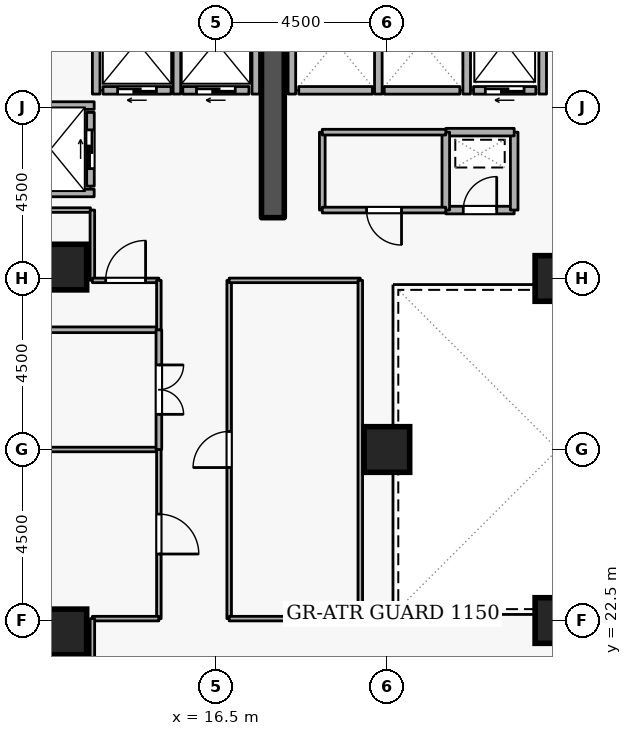
"""IFC4 building model, lengths in metres.
Left out: names, types, materials, properties, quantities, classifications, styles, units other than length and angle.
Written with IfcOpenShell. Run it as: python <this file> out.ifc"""

import sys

from ifc_helpers import new_model, si_unit, direction, frame, frame_2d, origin, origin_2d, place, context, subcontext, project, spatial, rectangle, extrude, element, fill, save


model = new_model("IFC4")
c1 = context("Model", 3, precision=1e-05, world=origin(), true_north=direction((0.0, 1.0)))
c2 = subcontext(c1, "Body", "Model", "MODEL_VIEW")
j1 = project(units=[si_unit("LENGTHUNIT", "METRE"), si_unit("PLANEANGLEUNIT", "RADIAN")], contexts=[c1])
p1 = place(None, origin())
s1 = spatial("IfcSite", under=j1, at=p1, CompositionType="ELEMENT")
p2 = place(p1, origin())
s2 = spatial("IfcBuilding", under=s1, at=p2, CompositionType="ELEMENT")
p3 = place(p2, frame((0.0, 0.0, 108.9)))
s3 = spatial("IfcBuildingStorey", under=s2, at=p3, CompositionType="ELEMENT", Elevation=108.9)
p4 = place(p3, frame((18.0, 33.1, 0.0), z_axis=(0.0, 0.0, 1.0), x_axis=(0.0, 1.0, 0.0)))
e1 = element("IfcWall", 1, at=p4, inside=s3, PredefinedType="SHEAR", context=c2, shape_type="SweptSolid", body=[
    extrude(rectangle(XDim=5.7, YDim=0.6, at=frame_2d((2.85, 0.0))), origin(), (0.0, 0.0, 1.0), 3.6),
])
for number, where, z_axis, x_axis in (
    (2, (12.5, 22.2, 0.0), (0.0, 0.0, 1.0), (1.0, 0.0, 0.0)),
    (3, (12.5, 31.8, 0.0), (0.0, 0.0, 1.0), (1.0, 0.0, 0.0)),
    (4, (25.5, 22.5, 0.0), (0.0, 0.0, 1.0), (1.0, 0.0, 0.0)),
    (5, (25.5, 31.5, 0.0), (0.0, 0.0, 1.0), (1.0, 0.0, 0.0)),
    (6, (21.0, 27.0, 0.0), (0.0, 0.0, 1.0), (1.0, 0.0, 0.0)),
):
    element("IfcColumn", number, at=place(p3, frame(where, z_axis=z_axis, x_axis=x_axis)), inside=s3, PredefinedType="COLUMN", context=c2, shape_type="SweptSolid", body=[
        extrude(rectangle(XDim=1.2, YDim=1.2, at=origin_2d()), origin(), (0.0, 0.0, 1.0), 3.6),
    ])
p5 = place(p3, frame((24.92, 36.45, 0.0), z_axis=(0.0, 0.0, 1.0), x_axis=(-1.0, 0.0, 0.0)))
e7 = element("IfcWall", 7, at=p5, inside=s3, PredefinedType="STANDARD", context=c2, shape_type="SweptSolid", body=[
    extrude(rectangle(XDim=1.64, YDim=0.2, at=frame_2d((0.82, 0.0))), origin(), (0.0, 0.0, 1.0), 3.34),
])
p6 = place(p5, frame((0.31, 0.0, 0.0)))
e8 = element("IfcOpeningElement", 8, at=p6, cuts=e7, PredefinedType="OPENING", context=c2, shape_type="SweptSolid", body=[
    extrude(rectangle(XDim=1.02, YDim=2.06, at=frame_2d((0.51, 1.03))), frame((0.0, 0.11, 0.0), z_axis=(0.0, -1.0, 0.0), x_axis=(1.0, 0.0, 0.0)), (0.0, 0.0, 1.0), 0.22),
])
p7 = place(p3, frame((22.92, 36.45, 0.0), z_axis=(0.0, 0.0, 1.0), x_axis=(-1.0, 0.0, 0.0)))
e9 = element("IfcWall", 9, at=p7, inside=s3, PredefinedType="STANDARD", context=c2, shape_type="SweptSolid", body=[
    extrude(rectangle(XDim=1.99, YDim=0.2, at=frame_2d((0.995, 0.0))), origin(), (0.0, 0.0, 1.0), 3.34),
])
p8 = place(p3, frame((20.62, 36.45, 0.0), z_axis=(0.0, 0.0, 1.0), x_axis=(-1.0, 0.0, 0.0)))
e10 = element("IfcWall", 10, at=p8, inside=s3, PredefinedType="STANDARD", context=c2, shape_type="SweptSolid", body=[
    extrude(rectangle(XDim=1.94, YDim=0.2, at=frame_2d((0.97, 0.0))), origin(), (0.0, 0.0, 1.0), 3.34),
])
p9 = place(p3, frame((17.37, 36.45, 0.0), z_axis=(0.0, 0.0, 1.0), x_axis=(-1.0, 0.0, 0.0)))
e11 = element("IfcWall", 11, at=p9, inside=s3, PredefinedType="STANDARD", context=c2, shape_type="SweptSolid", body=[
    extrude(rectangle(XDim=1.74, YDim=0.2, at=frame_2d((0.87, 0.0))), origin(), (0.0, 0.0, 1.0), 3.34),
])
p10 = place(p9, frame((0.36, 0.0, 0.0)))
e12 = element("IfcOpeningElement", 12, at=p10, cuts=e11, PredefinedType="OPENING", context=c2, shape_type="SweptSolid", body=[
    extrude(rectangle(XDim=1.02, YDim=2.06, at=frame_2d((0.51, 1.03))), frame((0.0, 0.11, 0.0), z_axis=(0.0, -1.0, 0.0), x_axis=(1.0, 0.0, 0.0)), (0.0, 0.0, 1.0), 0.22),
])
p11 = place(p3, frame((15.32, 36.45, 0.0), z_axis=(0.0, 0.0, 1.0), x_axis=(-1.0, 0.0, 0.0)))
e13 = element("IfcWall", 13, at=p11, inside=s3, PredefinedType="STANDARD", context=c2, shape_type="SweptSolid", body=[
    extrude(rectangle(XDim=1.79, YDim=0.2, at=frame_2d((0.895, 0.0))), origin(), (0.0, 0.0, 1.0), 3.34),
])
p12 = place(p11, frame((0.385, 0.0, 0.0)))
e14 = element("IfcOpeningElement", 14, at=p12, cuts=e13, PredefinedType="OPENING", context=c2, shape_type="SweptSolid", body=[
    extrude(rectangle(XDim=1.02, YDim=2.06, at=frame_2d((0.51, 1.03))), frame((0.0, 0.11, 0.0), z_axis=(0.0, -1.0, 0.0), x_axis=(1.0, 0.0, 0.0)), (0.0, 0.0, 1.0), 0.22),
])
p13 = place(p3, frame((13.2, 33.93, 0.0), z_axis=(0.0, 0.0, 1.0), x_axis=(0.0, 1.0, 0.0)))
e15 = element("IfcWall", 15, at=p13, inside=s3, PredefinedType="STANDARD", context=c2, shape_type="SweptSolid", body=[
    extrude(rectangle(XDim=1.94, YDim=0.2, at=frame_2d((0.97, 0.0))), origin(), (0.0, 0.0, 1.0), 3.34),
])
p14 = place(p13, frame((0.46, 0.0, 0.0)))
e16 = element("IfcOpeningElement", 16, at=p14, cuts=e15, PredefinedType="OPENING", context=c2, shape_type="SweptSolid", body=[
    extrude(rectangle(XDim=1.02, YDim=2.06, at=frame_2d((0.51, 1.03))), frame((0.0, 0.11, 0.0), z_axis=(0.0, -1.0, 0.0), x_axis=(1.0, 0.0, 0.0)), (0.0, 0.0, 1.0), 0.22),
])
for number, where, z_axis, x_axis in (
    (17, (25.1, 36.352, 0.0), (0.0, 0.0, 1.0), (0.0, 1.0, 0.0)),
    (18, (23.1, 36.352, 0.0), (0.0, 0.0, 1.0), (0.0, 1.0, 0.0)),
    (19, (20.775, 36.352, 0.0), (0.0, 0.0, 1.0), (0.0, 1.0, 0.0)),
    (20, (18.5, 36.352, 0.0), (0.0, 0.0, 1.0), (0.0, 1.0, 0.0)),
):
    element("IfcWall", number, at=place(p3, frame(where, z_axis=z_axis, x_axis=x_axis)), inside=s3, PredefinedType="STANDARD", context=c2, shape_type="SweptSolid", body=[
        extrude(rectangle(XDim=2.436, YDim=0.2, at=frame_2d((1.218, 0.0))), origin(), (0.0, 0.0, 1.0), 3.34),
    ])
p15 = place(p3, frame((17.55, 36.352, 0.0), z_axis=(0.0, 0.0, 1.0), x_axis=(0.0, 1.0, 0.0)))
e21 = element("IfcWall", 21, at=p15, inside=s3, PredefinedType="STANDARD", context=c2, shape_type="SweptSolid", body=[
    extrude(rectangle(XDim=2.636, YDim=0.2, at=frame_2d((1.318, 0.0))), origin(), (0.0, 0.0, 1.0), 2.545),
])
for number, where, z_axis, x_axis in (
    (22, (15.475, 36.352, 0.0), (0.0, 0.0, 1.0), (0.0, 1.0, 0.0)),
    (23, (13.35, 36.352, 0.0), (0.0, 0.0, 1.0), (0.0, 1.0, 0.0)),
):
    element("IfcWall", number, at=place(p3, frame(where, z_axis=z_axis, x_axis=x_axis)), inside=s3, PredefinedType="STANDARD", context=c2, shape_type="SweptSolid", body=[
        extrude(rectangle(XDim=2.636, YDim=0.2, at=frame_2d((1.318, 0.0))), origin(), (0.0, 0.0, 1.0), 3.34),
    ])
for number, where, z_axis, x_axis in (
    (24, (11.002, 36.05, 0.0), (0.0, 0.0, 1.0), (1.0, 0.0, 0.0)),
    (25, (11.002, 33.75, 0.0), (0.0, 0.0, 1.0), (1.0, 0.0, 0.0)),
):
    element("IfcWall", number, at=place(p3, frame(where, z_axis=z_axis, x_axis=x_axis)), inside=s3, PredefinedType="STANDARD", context=c2, shape_type="SweptSolid", body=[
        extrude(rectangle(XDim=2.296, YDim=0.2, at=frame_2d((1.148, 0.0))), origin(), (0.0, 0.0, 1.0), 3.34),
    ])
p16 = place(p3, frame((22.55, 33.3, 0.0), z_axis=(0.0, 0.0, 1.0), x_axis=(1.0, 0.0, 0.0)))
e26 = element("IfcWall", 26, at=p16, inside=s3, PredefinedType="STANDARD", context=c2, shape_type="SweptSolid", body=[
    extrude(rectangle(XDim=1.8, YDim=0.2, at=frame_2d((0.9, 0.0))), origin(), (0.0, 0.0, 1.0), 3.34),
])
p17 = place(p16, frame((0.46, 0.0, 0.0)))
e27 = element("IfcOpeningElement", 27, at=p17, cuts=e26, PredefinedType="OPENING", context=c2, shape_type="SweptSolid", body=[
    extrude(rectangle(XDim=0.88, YDim=2.04, at=frame_2d((0.44, 1.02))), frame((0.0, 0.11, 0.0), z_axis=(0.0, -1.0, 0.0), x_axis=(1.0, 0.0, 0.0)), (0.0, 0.0, 1.0), 0.22),
])
p18 = place(p3, frame((24.35, 33.3, 0.0), z_axis=(0.0, 0.0, 1.0), x_axis=(0.0, 1.0, 0.0)))
e28 = element("IfcWall", 28, at=p18, inside=s3, PredefinedType="STANDARD", context=c2, shape_type="SweptSolid", body=[
    extrude(rectangle(XDim=2.05, YDim=0.2, at=frame_2d((1.025, 0.0))), origin(), (0.0, 0.0, 1.0), 3.34),
])
p19 = place(p3, frame((24.35, 35.35, 0.0), z_axis=(0.0, 0.0, 1.0), x_axis=(-1.0, 0.0, 0.0)))
e29 = element("IfcWall", 29, at=p19, inside=s3, PredefinedType="STANDARD", context=c2, shape_type="SweptSolid", body=[
    extrude(rectangle(XDim=1.8, YDim=0.2, at=frame_2d((0.9, 0.0))), origin(), (0.0, 0.0, 1.0), 3.34),
])
p20 = place(p3, frame((22.55, 35.35, 0.0), z_axis=(0.0, 0.0, 1.0), x_axis=(0.0, -1.0, 0.0)))
e30 = element("IfcWall", 30, at=p20, inside=s3, PredefinedType="STANDARD", context=c2, shape_type="SweptSolid", body=[
    extrude(rectangle(XDim=2.05, YDim=0.2, at=frame_2d((1.025, 0.0))), origin(), (0.0, 0.0, 1.0), 3.34),
])
p21 = place(p3, frame((19.3, 33.3, 0.0), z_axis=(0.0, 0.0, 1.0), x_axis=(0.0, 1.0, 0.0)))
e31 = element("IfcWall", 31, at=p21, inside=s3, PredefinedType="PARTITIONING", context=c2, shape_type="SweptSolid", body=[
    extrude(rectangle(XDim=2.05, YDim=0.15, at=frame_2d((1.025, 0.0))), origin(), (0.0, 0.0, 1.0), 3.34),
])
p22 = place(p3, frame((19.3, 35.35, 0.0), z_axis=(0.0, 0.0, 1.0), x_axis=(1.0, 0.0, 0.0)))
e32 = element("IfcWall", 32, at=p22, inside=s3, PredefinedType="PARTITIONING", context=c2, shape_type="SweptSolid", body=[
    extrude(rectangle(XDim=3.25, YDim=0.15, at=frame_2d((1.625, 0.0))), origin(), (0.0, 0.0, 1.0), 3.34),
])
p23 = place(p3, frame((22.55, 33.3, 0.0), z_axis=(0.0, 0.0, 1.0), x_axis=(-1.0, 0.0, 0.0)))
e33 = element("IfcWall", 33, at=p23, inside=s3, PredefinedType="PARTITIONING", context=c2, shape_type="SweptSolid", body=[
    extrude(rectangle(XDim=3.25, YDim=0.15, at=frame_2d((1.625, 0.0))), origin(), (0.0, 0.0, 1.0), 3.34),
])
p24 = place(p23, frame((1.165, 0.0, 0.0)))
e34 = element("IfcOpeningElement", 34, at=p24, cuts=e33, PredefinedType="OPENING", context=c2, shape_type="SweptSolid", body=[
    extrude(rectangle(XDim=0.92, YDim=2.08, at=frame_2d((0.46, 1.04))), frame((0.0, 0.085, 0.0), z_axis=(0.0, -1.0, 0.0), x_axis=(1.0, 0.0, 0.0)), (0.0, 0.0, 1.0), 0.17),
])
p25 = place(p3, frame((1.58, 27.0, 0.0), z_axis=(0.0, 0.0, 1.0), x_axis=(1.0, 0.0, 0.0)))
e35 = element("IfcWall", 35, at=p25, inside=s3, PredefinedType="PARTITIONING", context=c2, shape_type="SweptSolid", body=[
    extrude(rectangle(XDim=13.42, YDim=0.12, at=frame_2d((6.71, 0.0))), origin(), (0.0, 0.0, 1.0), 2.882),
])
p26 = place(p3, frame((15.0, 27.0, 0.0), z_axis=(0.0, 0.0, 1.0), x_axis=(0.0, -1.0, 0.0)))
e36 = element("IfcWall", 36, at=p26, inside=s3, PredefinedType="PARTITIONING", context=c2, shape_type="SweptSolid", body=[
    extrude(rectangle(XDim=4.45, YDim=0.12, at=frame_2d((2.225, 0.0))), origin(), (0.0, 0.0, 1.0), 3.34),
])
p27 = place(p26, frame((1.7, 0.0, 0.0)))
e37 = element("IfcOpeningElement", 37, at=p27, cuts=e36, PredefinedType="OPENING", context=c2, shape_type="SweptSolid", body=[
    extrude(rectangle(XDim=1.05, YDim=2.1, at=frame_2d((0.525, 1.05))), frame((0.0, 0.07, 0.0), z_axis=(0.0, -1.0, 0.0), x_axis=(1.0, 0.0, 0.0)), (0.0, 0.0, 1.0), 0.14),
])
p28 = place(p3, frame((15.0, 22.55, 0.0), z_axis=(0.0, 0.0, 1.0), x_axis=(-1.0, 0.0, 0.0)))
e38 = element("IfcWall", 38, at=p28, inside=s3, PredefinedType="PARTITIONING", context=c2, shape_type="SweptSolid", body=[
    extrude(rectangle(XDim=1.75, YDim=0.12, at=frame_2d((0.875, 0.0))), origin(), (0.0, 0.0, 1.0), 3.34),
])
p29 = place(p3, frame((13.25, 22.55, 0.0), z_axis=(0.0, 0.0, 1.0), x_axis=(0.0, -1.0, 0.0)))
e39 = element("IfcWall", 39, at=p29, inside=s3, PredefinedType="PARTITIONING", context=c2, shape_type="SweptSolid", body=[
    extrude(rectangle(XDim=1.85, YDim=0.12, at=frame_2d((0.925, 0.0))), origin(), (0.0, 0.0, 1.0), 3.34),
])
p30 = place(p3, frame((1.58, 30.15, 0.0), z_axis=(0.0, 0.0, 1.0), x_axis=(1.0, 0.0, 0.0)))
e40 = element("IfcWall", 40, at=p30, inside=s3, PredefinedType="PARTITIONING", context=c2, shape_type="SweptSolid", body=[
    extrude(rectangle(XDim=13.42, YDim=0.15, at=frame_2d((6.71, 0.0))), origin(), (0.0, 0.0, 1.0), 3.34),
])
p31 = place(p3, frame((15.0, 30.15, 0.0), z_axis=(0.0, 0.0, 1.0), x_axis=(0.0, -1.0, 0.0)))
e41 = element("IfcWall", 41, at=p31, inside=s3, PredefinedType="PARTITIONING", context=c2, shape_type="SweptSolid", body=[
    extrude(rectangle(XDim=3.15, YDim=0.15, at=frame_2d((1.575, 0.0))), origin(), (0.0, 0.0, 1.0), 3.34),
])
p32 = place(p31, frame((0.925, 0.0, 0.0)))
e42 = element("IfcOpeningElement", 42, at=p32, cuts=e41, PredefinedType="OPENING", context=c2, shape_type="SweptSolid", body=[
    extrude(rectangle(XDim=1.3, YDim=2.12, at=frame_2d((0.65, 1.06))), frame((0.0, 0.085, 0.0), z_axis=(0.0, -1.0, 0.0), x_axis=(1.0, 0.0, 0.0)), (0.0, 0.0, 1.0), 0.17),
])
p33 = place(p3, frame((10.9, 33.3, 0.0), z_axis=(0.0, 0.0, 1.0), x_axis=(1.0, 0.0, 0.0)))
e43 = element("IfcWall", 43, at=p33, inside=s3, PredefinedType="PARTITIONING", context=c2, shape_type="SweptSolid", body=[
    extrude(rectangle(XDim=2.3, YDim=0.12, at=frame_2d((1.15, 0.0))), origin(), (0.0, 0.0, 1.0), 3.34),
])
p34 = place(p3, frame((13.25, 33.3, 0.0), z_axis=(0.0, 0.0, 1.0), x_axis=(0.0, -1.0, 0.0)))
e44 = element("IfcWall", 44, at=p34, inside=s3, PredefinedType="PARTITIONING", context=c2, shape_type="SweptSolid", body=[
    extrude(rectangle(XDim=1.85, YDim=0.12, at=frame_2d((0.925, 0.0))), origin(), (0.0, 0.0, 1.0), 3.34),
])
p35 = place(p3, frame((13.25, 31.45, 0.0), z_axis=(0.0, 0.0, 1.0), x_axis=(1.0, 0.0, 0.0)))
e45 = element("IfcWall", 45, at=p35, inside=s3, PredefinedType="PARTITIONING", context=c2, shape_type="SweptSolid", body=[
    extrude(rectangle(XDim=1.75, YDim=0.12, at=frame_2d((0.875, 0.0))), origin(), (0.0, 0.0, 1.0), 3.34),
])
p36 = place(p35, frame((0.35, 0.0, 0.0)))
e46 = element("IfcOpeningElement", 46, at=p36, cuts=e45, PredefinedType="OPENING", context=c2, shape_type="SweptSolid", body=[
    extrude(rectangle(XDim=1.05, YDim=2.1, at=frame_2d((0.525, 1.05))), frame((0.0, 0.07, 0.0), z_axis=(0.0, -1.0, 0.0), x_axis=(1.0, 0.0, 0.0)), (0.0, 0.0, 1.0), 0.14),
])
p37 = place(p3, frame((15.0, 31.45, 0.0), z_axis=(0.0, 0.0, 1.0), x_axis=(0.0, -1.0, 0.0)))
e47 = element("IfcWall", 47, at=p37, inside=s3, PredefinedType="PARTITIONING", context=c2, shape_type="SweptSolid", body=[
    extrude(rectangle(XDim=1.3, YDim=0.12, at=frame_2d((0.65, 0.0))), origin(), (0.0, 0.0, 1.0), 3.34),
])
p38 = place(p3, frame((16.85, 22.55, 0.0), z_axis=(0.0, 0.0, 1.0), x_axis=(0.0, 1.0, 0.0)))
e48 = element("IfcWall", 48, at=p38, inside=s3, PredefinedType="PARTITIONING", context=c2, shape_type="SweptSolid", body=[
    extrude(rectangle(XDim=8.9, YDim=0.12, at=frame_2d((4.45, 0.0))), origin(), (0.0, 0.0, 1.0), 3.34),
])
p39 = place(p38, frame((3.975, 0.0, 0.0)))
e49 = element("IfcOpeningElement", 49, at=p39, cuts=e48, PredefinedType="OPENING", context=c2, shape_type="SweptSolid", body=[
    extrude(rectangle(XDim=0.95, YDim=2.1, at=frame_2d((0.475, 1.05))), frame((0.0, 0.07, 0.0), z_axis=(0.0, -1.0, 0.0), x_axis=(1.0, 0.0, 0.0)), (0.0, 0.0, 1.0), 0.14),
])
p40 = place(p3, frame((16.85, 31.45, 0.0), z_axis=(0.0, 0.0, 1.0), x_axis=(1.0, 0.0, 0.0)))
e50 = element("IfcWall", 50, at=p40, inside=s3, PredefinedType="PARTITIONING", context=c2, shape_type="SweptSolid", body=[
    extrude(rectangle(XDim=3.45, YDim=0.12, at=frame_2d((1.725, 0.0))), origin(), (0.0, 0.0, 1.0), 3.34),
])
p41 = place(p3, frame((20.3, 31.45, 0.0), z_axis=(0.0, 0.0, 1.0), x_axis=(0.0, -1.0, 0.0)))
e51 = element("IfcWall", 51, at=p41, inside=s3, PredefinedType="PARTITIONING", context=c2, shape_type="SweptSolid", body=[
    extrude(rectangle(XDim=8.9, YDim=0.12, at=frame_2d((4.45, 0.0))), origin(), (0.0, 0.0, 1.0), 3.34),
])
p42 = place(p3, frame((20.3, 22.55, 0.0), z_axis=(0.0, 0.0, 1.0), x_axis=(-1.0, 0.0, 0.0)))
e52 = element("IfcWall", 52, at=p42, inside=s3, PredefinedType="PARTITIONING", context=c2, shape_type="SweptSolid", body=[
    extrude(rectangle(XDim=3.45, YDim=0.12, at=frame_2d((1.725, 0.0))), origin(), (0.0, 0.0, 1.0), 3.34),
])
p43 = place(p6, origin())
e53 = element("IfcDoor", 53, at=p43, inside=s3, OperationType="SLIDING_TO_LEFT", PredefinedType="DOOR", context=c2, shape_type="SweptSolid", body=[
    extrude(rectangle(XDim=1.02, YDim=2.06, at=frame_2d((0.51, 1.03))), frame((0.0, 0.025, 0.0), z_axis=(0.0, -1.0, 0.0), x_axis=(1.0, 0.0, 0.0)), (0.0, 0.0, 1.0), 0.05),
])
fill(e8, e53)
p44 = place(p10, origin())
e54 = element("IfcDoor", 54, at=p44, inside=s3, OperationType="SLIDING_TO_LEFT", PredefinedType="DOOR", context=c2, shape_type="SweptSolid", body=[
    extrude(rectangle(XDim=1.02, YDim=2.06, at=frame_2d((0.51, 1.03))), frame((0.0, 0.025, 0.0), z_axis=(0.0, -1.0, 0.0), x_axis=(1.0, 0.0, 0.0)), (0.0, 0.0, 1.0), 0.05),
])
fill(e12, e54)
p45 = place(p12, origin())
e55 = element("IfcDoor", 55, at=p45, inside=s3, OperationType="SLIDING_TO_LEFT", PredefinedType="DOOR", context=c2, shape_type="SweptSolid", body=[
    extrude(rectangle(XDim=1.02, YDim=2.06, at=frame_2d((0.51, 1.03))), frame((0.0, 0.025, 0.0), z_axis=(0.0, -1.0, 0.0), x_axis=(1.0, 0.0, 0.0)), (0.0, 0.0, 1.0), 0.05),
])
fill(e14, e55)
p46 = place(p14, origin())
e56 = element("IfcDoor", 56, at=p46, inside=s3, OperationType="SLIDING_TO_LEFT", PredefinedType="DOOR", context=c2, shape_type="SweptSolid", body=[
    extrude(rectangle(XDim=1.02, YDim=2.06, at=frame_2d((0.51, 1.03))), frame((0.0, 0.025, 0.0), z_axis=(0.0, -1.0, 0.0), x_axis=(1.0, 0.0, 0.0)), (0.0, 0.0, 1.0), 0.05),
])
fill(e16, e56)
p47 = place(p17, origin())
e57 = element("IfcDoor", 57, at=p47, inside=s3, OperationType="SINGLE_SWING_RIGHT", PredefinedType="DOOR", context=c2, shape_type="SweptSolid", body=[
    extrude(rectangle(XDim=0.88, YDim=2.04, at=frame_2d((0.44, 1.02))), frame((0.0, 0.025, 0.0), z_axis=(0.0, -1.0, 0.0), x_axis=(1.0, 0.0, 0.0)), (0.0, 0.0, 1.0), 0.05),
])
fill(e27, e57)
p48 = place(p24, origin())
e58 = element("IfcDoor", 58, at=p48, inside=s3, OperationType="SINGLE_SWING_LEFT", PredefinedType="DOOR", context=c2, shape_type="SweptSolid", body=[
    extrude(rectangle(XDim=0.92, YDim=2.08, at=frame_2d((0.46, 1.04))), frame((0.0, 0.025, 0.0), z_axis=(0.0, -1.0, 0.0), x_axis=(1.0, 0.0, 0.0)), (0.0, 0.0, 1.0), 0.05),
])
fill(e34, e58)
p49 = place(p27, origin())
e59 = element("IfcDoor", 59, at=p49, inside=s3, OperationType="SINGLE_SWING_RIGHT", PredefinedType="DOOR", context=c2, shape_type="SweptSolid", body=[
    extrude(rectangle(XDim=1.05, YDim=2.1, at=frame_2d((0.525, 1.05))), frame((0.0, 0.025, 0.0), z_axis=(0.0, -1.0, 0.0), x_axis=(1.0, 0.0, 0.0)), (0.0, 0.0, 1.0), 0.05),
])
fill(e37, e59)
p50 = place(p32, origin())
e60 = element("IfcDoor", 60, at=p50, inside=s3, OperationType="DOUBLE_DOOR_SINGLE_SWING", PredefinedType="DOOR", context=c2, shape_type="SweptSolid", body=[
    extrude(rectangle(XDim=1.3, YDim=2.12, at=frame_2d((0.65, 1.06))), frame((0.0, 0.025, 0.0), z_axis=(0.0, -1.0, 0.0), x_axis=(1.0, 0.0, 0.0)), (0.0, 0.0, 1.0), 0.05),
])
fill(e42, e60)
p51 = place(p36, origin())
e61 = element("IfcDoor", 61, at=p51, inside=s3, OperationType="SINGLE_SWING_RIGHT", PredefinedType="DOOR", context=c2, shape_type="SweptSolid", body=[
    extrude(rectangle(XDim=1.05, YDim=2.1, at=frame_2d((0.525, 1.05))), frame((0.0, 0.025, 0.0), z_axis=(0.0, -1.0, 0.0), x_axis=(1.0, 0.0, 0.0)), (0.0, 0.0, 1.0), 0.05),
])
fill(e46, e61)
p52 = place(p39, origin())
e62 = element("IfcDoor", 62, at=p52, inside=s3, OperationType="SINGLE_SWING_LEFT", PredefinedType="DOOR", context=c2, shape_type="SweptSolid", body=[
    extrude(rectangle(XDim=0.95, YDim=2.1, at=frame_2d((0.475, 1.05))), frame((0.0, 0.025, 0.0), z_axis=(0.0, -1.0, 0.0), x_axis=(1.0, 0.0, 0.0)), (0.0, 0.0, 1.0), 0.05),
])
fill(e49, e62)
save(model, sys.argv[1])
